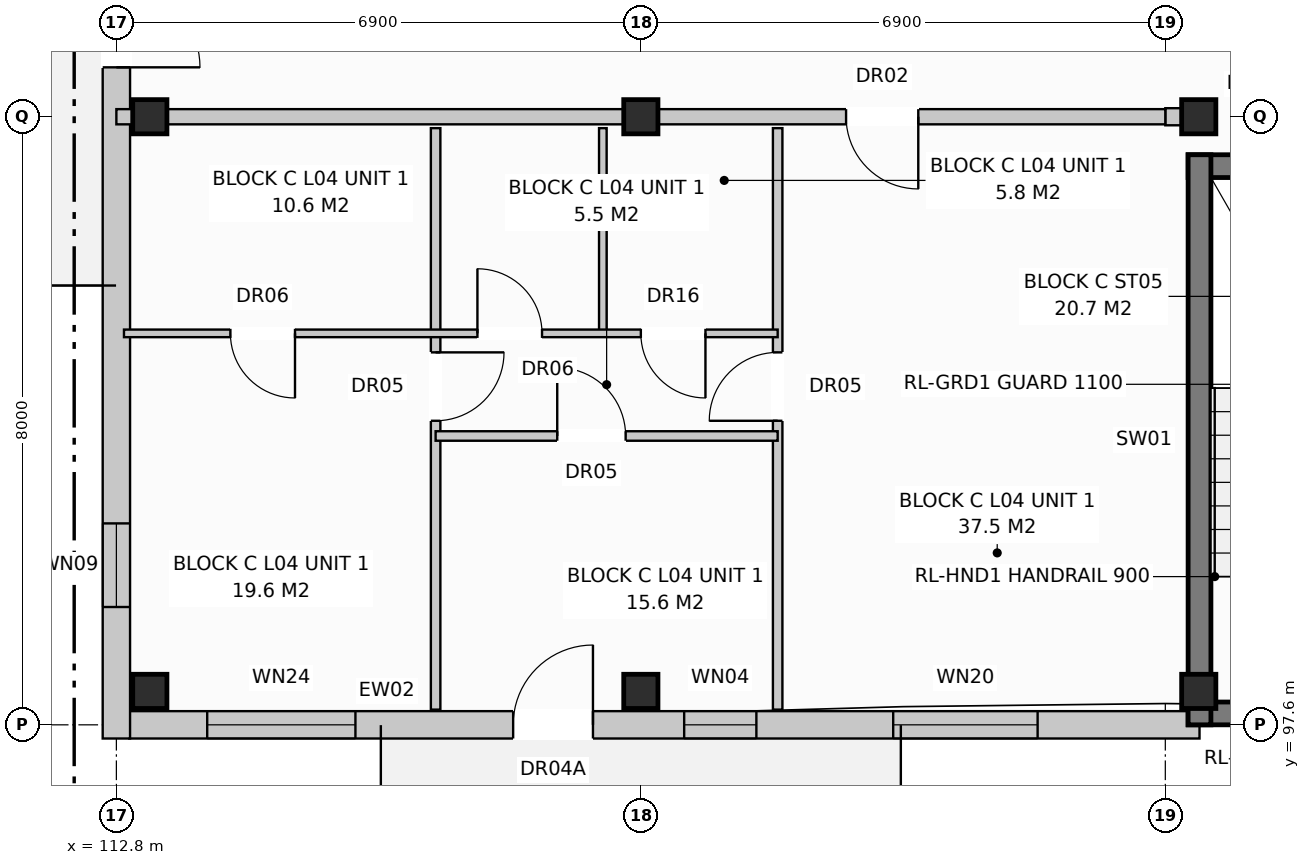
"""IFC4 building model, lengths in metres.
Left out: names, types, materials, properties, quantities, classifications, styles, units other than length and angle.
Written with IfcOpenShell. Run it as: python <this file> out.ifc"""

import sys

from ifc_helpers import new_model, si_unit, direction, frame, frame_2d, origin, origin_with_axes, origin_2d, place, context, subcontext, project, spatial, rectangle, extrude, element, fill, save


model = new_model("IFC4")
c1 = context("Model", 3, precision=1e-05, world=origin(), true_north=direction((0.0, 1.0)))
c2 = subcontext(c1, "Body", "Model", "MODEL_VIEW")
j1 = project(units=[si_unit("LENGTHUNIT", "METRE"), si_unit("PLANEANGLEUNIT", "RADIAN")], contexts=[c1])
p1 = place(None, origin())
s1 = spatial("IfcSite", under=j1, at=p1, CompositionType="ELEMENT")
p2 = place(p1, origin())
s2 = spatial("IfcBuilding", under=s1, at=p2, CompositionType="ELEMENT")
p3 = place(p2, frame((0.0, 0.0, 14.4)))
s3 = spatial("IfcBuildingStorey", under=s2, at=p3, CompositionType="ELEMENT", Elevation=14.4)
for number, where, z_axis, x_axis in (
    (1, (113.24, 98.04, 0.0), (0.0, 0.0, 1.0), (1.0, 0.0, 0.0)),
    (2, (113.24, 105.6, 0.0), (0.0, 0.0, 1.0), (1.0, 0.0, 0.0)),
    (3, (119.7, 98.04, 0.0), (0.0, 0.0, 1.0), (1.0, 0.0, 0.0)),
    (4, (119.7, 105.6, 0.0), (0.0, 0.0, 1.0), (1.0, 0.0, 0.0)),
    (5, (127.04, 98.04, 0.0), (0.0, 0.0, 1.0), (1.0, 0.0, 0.0)),
    (6, (127.04, 105.6, 0.0), (0.0, 0.0, 1.0), (1.0, 0.0, 0.0)),
):
    element("IfcColumn", number, at=place(p3, frame(where, z_axis=z_axis, x_axis=x_axis)), inside=s3, PredefinedType="COLUMN", context=c2, shape_type="SweptSolid", body=[
        extrude(rectangle(XDim=0.45, YDim=0.45, at=origin_2d()), origin(), (0.0, 0.0, 1.0), 3.2),
    ])
p4 = place(p3, frame((112.97, 97.6, 0.0), z_axis=(0.0, 0.0, 1.0), x_axis=(1.0, 0.0, 0.0)))
e7 = element("IfcWall", 7, at=p4, inside=s3, PredefinedType="STANDARD", context=c2, shape_type="SweptSolid", body=[
    extrude(rectangle(XDim=14.08, YDim=0.36, at=frame_2d((7.04, 0.0))), origin(), (0.0, 0.0, 1.0), 2.94),
])
p5 = place(p4, frame((5.05, 0.0, 0.0)))
e8 = element("IfcOpeningElement", 8, at=p5, cuts=e7, PredefinedType="OPENING", context=c2, shape_type="SweptSolid", body=[
    extrude(rectangle(XDim=1.05, YDim=2.12, at=frame_2d((0.525, 1.06))), frame((0.0, 0.192, 0.0), z_axis=(0.0, -1.0, 0.0), x_axis=(1.0, 0.0, 0.0)), (0.0, 0.0, 1.0), 0.384),
])
p6 = place(p4, frame((1.025, 0.0, 0.8)))
e9 = element("IfcOpeningElement", 9, at=p6, cuts=e7, PredefinedType="OPENING", context=c2, shape_type="SweptSolid", body=[
    extrude(rectangle(XDim=1.95, YDim=1.65, at=frame_2d((0.975, 0.825))), frame((0.0, 0.192, 0.0), z_axis=(0.0, -1.0, 0.0), x_axis=(1.0, 0.0, 0.0)), (0.0, 0.0, 1.0), 0.384),
])
p7 = place(p4, frame((7.3, 0.0, 0.9)))
e10 = element("IfcOpeningElement", 10, at=p7, cuts=e7, PredefinedType="OPENING", context=c2, shape_type="SweptSolid", body=[
    extrude(rectangle(XDim=0.95, YDim=1.55, at=frame_2d((0.475, 0.775))), frame((0.0, 0.192, 0.0), z_axis=(0.0, -1.0, 0.0), x_axis=(1.0, 0.0, 0.0)), (0.0, 0.0, 1.0), 0.384),
])
p8 = place(p4, frame((10.05, 0.0, 0.8)))
e11 = element("IfcOpeningElement", 11, at=p8, cuts=e7, PredefinedType="OPENING", context=c2, shape_type="SweptSolid", body=[
    extrude(rectangle(XDim=1.9, YDim=1.85, at=frame_2d((0.95, 0.925))), frame((0.0, 0.192, 0.0), z_axis=(0.0, -1.0, 0.0), x_axis=(1.0, 0.0, 0.0)), (0.0, 0.0, 1.0), 0.384),
])
p9 = place(p3, frame((112.8, 97.42, 0.0), z_axis=(0.0, 0.0, 1.0), x_axis=(0.0, 1.0, 0.0)))
e12 = element("IfcWall", 12, at=p9, inside=s3, PredefinedType="STANDARD", context=c2, shape_type="SweptSolid", body=[
    extrude(rectangle(XDim=18.76, YDim=0.36, at=frame_2d((9.38, 0.0))), origin(), (0.0, 0.0, 1.0), 2.94),
])
p10 = place(p9, frame((8.83, 0.0, 0.0)))
e13 = element("IfcOpeningElement", 13, at=p10, cuts=e12, PredefinedType="OPENING", context=c2, shape_type="SweptSolid", body=[
    extrude(rectangle(XDim=1.1, YDim=2.1, at=frame_2d((0.55, 1.05))), frame((0.0, 0.192, 0.0), z_axis=(0.0, -1.0, 0.0), x_axis=(1.0, 0.0, 0.0)), (0.0, 0.0, 1.0), 0.384),
])
p11 = place(p9, frame((1.73, 0.0, 0.72)))
e14 = element("IfcOpeningElement", 14, at=p11, cuts=e12, PredefinedType="OPENING", context=c2, shape_type="SweptSolid", body=[
    extrude(rectangle(XDim=1.1, YDim=1.5, at=frame_2d((0.55, 0.75))), frame((0.0, 0.192, 0.0), z_axis=(0.0, -1.0, 0.0), x_axis=(1.0, 0.0, 0.0)), (0.0, 0.0, 1.0), 0.384),
])
p12 = place(p9, frame((15.93, 0.0, 0.72)))
e15 = element("IfcOpeningElement", 15, at=p12, cuts=e12, PredefinedType="OPENING", context=c2, shape_type="SweptSolid", body=[
    extrude(rectangle(XDim=1.1, YDim=1.5, at=frame_2d((0.55, 0.75))), frame((0.0, 0.192, 0.0), z_axis=(0.0, -1.0, 0.0), x_axis=(1.0, 0.0, 0.0)), (0.0, 0.0, 1.0), 0.384),
])
for number, where, z_axis, x_axis in (
    (16, (126.9, 97.75, 0.0), (0.0, 0.0, 1.0), (1.0, 0.0, 0.0)),
    (17, (126.9, 104.95, 0.0), (0.0, 0.0, 1.0), (1.0, 0.0, 0.0)),
):
    element("IfcWall", number, at=place(p3, frame(where, z_axis=z_axis, x_axis=x_axis)), inside=s3, PredefinedType="SHEAR", context=c2, shape_type="SweptSolid", body=[
        extrude(rectangle(XDim=3.6, YDim=0.3, at=frame_2d((1.8, 0.0))), origin(), (0.0, 0.0, 1.0), 2.94),
    ])
p13 = place(p3, frame((127.05, 97.6, 0.0), z_axis=(0.0, 0.0, 1.0), x_axis=(0.0, 1.0, 0.0)))
e18 = element("IfcWall", 18, at=p13, inside=s3, PredefinedType="SHEAR", context=c2, shape_type="SweptSolid", body=[
    extrude(rectangle(XDim=7.5, YDim=0.3, at=frame_2d((3.75, 0.0))), origin(), (0.0, 0.0, 1.0), 2.94),
])
p14 = place(p3, frame((126.6, 105.6, 0.0), z_axis=(0.0, 0.0, 1.0), x_axis=(1.0, 0.0, 0.0)))
e19 = element("IfcWall", 19, at=p14, inside=s3, PredefinedType="PARTITIONING", context=c2, shape_type="SweptSolid", body=[
    extrude(rectangle(XDim=0.3, YDim=0.225, at=frame_2d((0.15, 0.0))), origin(), (0.0, 0.0, 1.0), 2.94),
])
p15 = place(p3, frame((112.8, 105.6, 0.0), z_axis=(0.0, 0.0, 1.0), x_axis=(1.0, 0.0, 0.0)))
e20 = element("IfcWall", 20, at=p15, inside=s3, PredefinedType="PARTITIONING", context=c2, shape_type="SweptSolid", body=[
    extrude(rectangle(XDim=13.8, YDim=0.2, at=frame_2d((6.9, 0.0))), origin(), (0.0, 0.0, 1.0), 2.38),
])
p16 = place(p15, frame((9.6, 0.0, 0.0)))
e21 = element("IfcOpeningElement", 21, at=p16, cuts=e20, PredefinedType="OPENING", context=c2, shape_type="SweptSolid", body=[
    extrude(rectangle(XDim=0.95, YDim=2.15, at=frame_2d((0.475, 1.075))), frame((0.0, 0.112, 0.0), z_axis=(0.0, -1.0, 0.0), x_axis=(1.0, 0.0, 0.0)), (0.0, 0.0, 1.0), 0.224),
])
p17 = place(p3, frame((121.5, 105.45, 0.0), z_axis=(0.0, 0.0, 1.0), x_axis=(0.0, -1.0, 0.0)))
e22 = element("IfcWall", 22, at=p17, inside=s3, PredefinedType="PARTITIONING", context=c2, shape_type="SweptSolid", body=[
    extrude(rectangle(XDim=7.65, YDim=0.125, at=frame_2d((3.825, 0.0))), origin(), (0.0, 0.0, 1.0), 2.94),
])
p18 = place(p17, frame((2.95, 0.0, 0.0)))
e23 = element("IfcOpeningElement", 23, at=p18, cuts=e22, PredefinedType="OPENING", context=c2, shape_type="SweptSolid", body=[
    extrude(rectangle(XDim=0.9, YDim=2.1, at=frame_2d((0.45, 1.05))), frame((0.0, 0.074, 0.0), z_axis=(0.0, -1.0, 0.0), x_axis=(1.0, 0.0, 0.0)), (0.0, 0.0, 1.0), 0.149),
])
p19 = place(p3, frame((117.0, 105.45, 0.0), z_axis=(0.0, 0.0, 1.0), x_axis=(0.0, -1.0, 0.0)))
e24 = element("IfcWall", 24, at=p19, inside=s3, PredefinedType="PARTITIONING", context=c2, shape_type="SweptSolid", body=[
    extrude(rectangle(XDim=7.65, YDim=0.125, at=frame_2d((3.825, 0.0))), origin(), (0.0, 0.0, 1.0), 2.59),
])
p20 = place(p19, frame((2.95, 0.0, 0.0)))
e25 = element("IfcOpeningElement", 25, at=p20, cuts=e24, PredefinedType="OPENING", context=c2, shape_type="SweptSolid", body=[
    extrude(rectangle(XDim=0.9, YDim=2.1, at=frame_2d((0.45, 1.05))), frame((0.0, 0.074, 0.0), z_axis=(0.0, -1.0, 0.0), x_axis=(1.0, 0.0, 0.0)), (0.0, 0.0, 1.0), 0.149),
])
p21 = place(p3, frame((119.2, 105.45, 0.0), z_axis=(0.0, 0.0, 1.0), x_axis=(0.0, -1.0, 0.0)))
e26 = element("IfcWall", 26, at=p21, inside=s3, PredefinedType="PARTITIONING", context=c2, shape_type="SweptSolid", body=[
    extrude(rectangle(XDim=2.7, YDim=0.1, at=frame_2d((1.35, 0.0))), origin(), (0.0, 0.0, 1.0), 2.94),
])
p22 = place(p3, frame((112.9, 102.75, 0.0), z_axis=(0.0, 0.0, 1.0), x_axis=(1.0, 0.0, 0.0)))
e27 = element("IfcWall", 27, at=p22, inside=s3, PredefinedType="PARTITIONING", context=c2, shape_type="SweptSolid", body=[
    extrude(rectangle(XDim=8.6, YDim=0.1, at=frame_2d((4.3, 0.0))), origin(), (0.0, 0.0, 1.0), 2.94),
])
p23 = place(p22, frame((1.4, 0.0, 0.0)))
e28 = element("IfcOpeningElement", 28, at=p23, cuts=e27, PredefinedType="OPENING", context=c2, shape_type="SweptSolid", body=[
    extrude(rectangle(XDim=0.85, YDim=2.05, at=frame_2d((0.425, 1.025))), frame((0.0, 0.062, 0.0), z_axis=(0.0, -1.0, 0.0), x_axis=(1.0, 0.0, 0.0)), (0.0, 0.0, 1.0), 0.124),
])
p24 = place(p22, frame((4.65, 0.0, 0.0)))
e29 = element("IfcOpeningElement", 29, at=p24, cuts=e27, PredefinedType="OPENING", context=c2, shape_type="SweptSolid", body=[
    extrude(rectangle(XDim=0.85, YDim=2.05, at=frame_2d((0.425, 1.025))), frame((0.0, 0.062, 0.0), z_axis=(0.0, -1.0, 0.0), x_axis=(1.0, 0.0, 0.0)), (0.0, 0.0, 1.0), 0.124),
])
p25 = place(p22, frame((6.8, 0.0, 0.0)))
e30 = element("IfcOpeningElement", 30, at=p25, cuts=e27, PredefinedType="OPENING", context=c2, shape_type="SweptSolid", body=[
    extrude(rectangle(XDim=0.85, YDim=2.1, at=frame_2d((0.425, 1.05))), frame((0.0, 0.062, 0.0), z_axis=(0.0, -1.0, 0.0), x_axis=(1.0, 0.0, 0.0)), (0.0, 0.0, 1.0), 0.124),
])
p26 = place(p3, frame((117.0, 101.4, 0.0), z_axis=(0.0, 0.0, 1.0), x_axis=(1.0, 0.0, 0.0)))
e31 = element("IfcWall", 31, at=p26, inside=s3, PredefinedType="PARTITIONING", context=c2, shape_type="SweptSolid", body=[
    extrude(rectangle(XDim=4.5, YDim=0.125, at=frame_2d((2.25, 0.0))), origin(), (0.0, 0.0, 1.0), 2.94),
])
p27 = place(p26, frame((1.6, 0.0, 0.0)))
e32 = element("IfcOpeningElement", 32, at=p27, cuts=e31, PredefinedType="OPENING", context=c2, shape_type="SweptSolid", body=[
    extrude(rectangle(XDim=0.9, YDim=2.1, at=frame_2d((0.45, 1.05))), frame((0.0, 0.074, 0.0), z_axis=(0.0, -1.0, 0.0), x_axis=(1.0, 0.0, 0.0)), (0.0, 0.0, 1.0), 0.149),
])
p28 = place(p5, origin_with_axes())
e33 = element("IfcDoor", 33, at=p28, inside=s3, OperationType="SINGLE_SWING_RIGHT", PredefinedType="DOOR", context=c2, shape_type="SweptSolid", body=[
    extrude(rectangle(XDim=1.05, YDim=2.12, at=frame_2d((0.525, 1.06))), frame((0.0, 0.025, 0.0), z_axis=(0.0, -1.0, 0.0), x_axis=(1.0, 0.0, 0.0)), (0.0, 0.0, 1.0), 0.05),
])
fill(e8, e33)
p29 = place(p6, origin_with_axes())
e34 = element("IfcWindow", 34, at=p29, inside=s3, PartitioningType="SINGLE_PANEL", PredefinedType="WINDOW", context=c2, shape_type="SweptSolid", body=[
    extrude(rectangle(XDim=1.95, YDim=1.65, at=frame_2d((0.975, 0.825))), frame((0.0, 0.03, 0.0), z_axis=(0.0, -1.0, 0.0), x_axis=(1.0, 0.0, 0.0)), (0.0, 0.0, 1.0), 0.06),
])
fill(e9, e34)
p30 = place(p7, origin_with_axes())
e35 = element("IfcWindow", 35, at=p30, inside=s3, PartitioningType="SINGLE_PANEL", PredefinedType="WINDOW", context=c2, shape_type="SweptSolid", body=[
    extrude(rectangle(XDim=0.95, YDim=1.55, at=frame_2d((0.475, 0.775))), frame((0.0, 0.03, 0.0), z_axis=(0.0, -1.0, 0.0), x_axis=(1.0, 0.0, 0.0)), (0.0, 0.0, 1.0), 0.06),
])
fill(e10, e35)
p31 = place(p8, origin_with_axes())
e36 = element("IfcWindow", 36, at=p31, inside=s3, PartitioningType="SINGLE_PANEL", PredefinedType="WINDOW", context=c2, shape_type="SweptSolid", body=[
    extrude(rectangle(XDim=1.9, YDim=1.85, at=frame_2d((0.95, 0.925))), frame((0.0, 0.03, 0.0), z_axis=(0.0, -1.0, 0.0), x_axis=(1.0, 0.0, 0.0)), (0.0, 0.0, 1.0), 0.06),
])
fill(e11, e36)
p32 = place(p10, frame((1.1, 0.0, 0.0), z_axis=(0.0, 0.0, 1.0), x_axis=(-1.0, 0.0, 0.0)))
e37 = element("IfcDoor", 37, at=p32, inside=s3, OperationType="SINGLE_SWING_LEFT", PredefinedType="DOOR", context=c2, shape_type="SweptSolid", body=[
    extrude(rectangle(XDim=1.1, YDim=2.1, at=frame_2d((0.55, 1.05))), frame((0.0, 0.025, 0.0), z_axis=(0.0, -1.0, 0.0), x_axis=(1.0, 0.0, 0.0)), (0.0, 0.0, 1.0), 0.05),
])
fill(e13, e37)
p33 = place(p11, origin_with_axes())
e38 = element("IfcWindow", 38, at=p33, inside=s3, PartitioningType="SINGLE_PANEL", PredefinedType="WINDOW", context=c2, shape_type="SweptSolid", body=[
    extrude(rectangle(XDim=1.1, YDim=1.5, at=frame_2d((0.55, 0.75))), frame((0.0, 0.03, 0.0), z_axis=(0.0, -1.0, 0.0), x_axis=(1.0, 0.0, 0.0)), (0.0, 0.0, 1.0), 0.06),
])
fill(e14, e38)
p34 = place(p16, frame((0.95, 0.0, 0.0), z_axis=(0.0, 0.0, 1.0), x_axis=(-1.0, 0.0, 0.0)))
e39 = element("IfcDoor", 39, at=p34, inside=s3, OperationType="SINGLE_SWING_RIGHT", PredefinedType="DOOR", context=c2, shape_type="SweptSolid", body=[
    extrude(rectangle(XDim=0.95, YDim=2.15, at=frame_2d((0.475, 1.075))), frame((0.0, 0.025, 0.0), z_axis=(0.0, -1.0, 0.0), x_axis=(1.0, 0.0, 0.0)), (0.0, 0.0, 1.0), 0.05),
])
fill(e21, e39)
p35 = place(p18, frame((0.9, 0.0, 0.0), z_axis=(0.0, 0.0, 1.0), x_axis=(-1.0, 0.0, 0.0)))
e40 = element("IfcDoor", 40, at=p35, inside=s3, OperationType="SINGLE_SWING_RIGHT", PredefinedType="DOOR", context=c2, shape_type="SweptSolid", body=[
    extrude(rectangle(XDim=0.9, YDim=2.1, at=frame_2d((0.45, 1.05))), frame((0.0, 0.025, 0.0), z_axis=(0.0, -1.0, 0.0), x_axis=(1.0, 0.0, 0.0)), (0.0, 0.0, 1.0), 0.05),
])
fill(e23, e40)
p36 = place(p20, origin_with_axes())
e41 = element("IfcDoor", 41, at=p36, inside=s3, OperationType="SINGLE_SWING_LEFT", PredefinedType="DOOR", context=c2, shape_type="SweptSolid", body=[
    extrude(rectangle(XDim=0.9, YDim=2.1, at=frame_2d((0.45, 1.05))), frame((0.0, 0.025, 0.0), z_axis=(0.0, -1.0, 0.0), x_axis=(1.0, 0.0, 0.0)), (0.0, 0.0, 1.0), 0.05),
])
fill(e25, e41)
p37 = place(p23, frame((0.85, 0.0, 0.0), z_axis=(0.0, 0.0, 1.0), x_axis=(-1.0, 0.0, 0.0)))
e42 = element("IfcDoor", 42, at=p37, inside=s3, OperationType="SINGLE_SWING_RIGHT", PredefinedType="DOOR", context=c2, shape_type="SweptSolid", body=[
    extrude(rectangle(XDim=0.85, YDim=2.05, at=frame_2d((0.425, 1.025))), frame((0.0, 0.025, 0.0), z_axis=(0.0, -1.0, 0.0), x_axis=(1.0, 0.0, 0.0)), (0.0, 0.0, 1.0), 0.05),
])
fill(e28, e42)
p38 = place(p24, origin_with_axes())
e43 = element("IfcDoor", 43, at=p38, inside=s3, OperationType="SINGLE_SWING_LEFT", PredefinedType="DOOR", context=c2, shape_type="SweptSolid", body=[
    extrude(rectangle(XDim=0.85, YDim=2.05, at=frame_2d((0.425, 1.025))), frame((0.0, 0.025, 0.0), z_axis=(0.0, -1.0, 0.0), x_axis=(1.0, 0.0, 0.0)), (0.0, 0.0, 1.0), 0.05),
])
fill(e29, e43)
p39 = place(p25, frame((0.85, 0.0, 0.0), z_axis=(0.0, 0.0, 1.0), x_axis=(-1.0, 0.0, 0.0)))
e44 = element("IfcDoor", 44, at=p39, inside=s3, OperationType="SINGLE_SWING_RIGHT", PredefinedType="DOOR", context=c2, shape_type="SweptSolid", body=[
    extrude(rectangle(XDim=0.85, YDim=2.1, at=frame_2d((0.425, 1.05))), frame((0.0, 0.025, 0.0), z_axis=(0.0, -1.0, 0.0), x_axis=(1.0, 0.0, 0.0)), (0.0, 0.0, 1.0), 0.05),
])
fill(e30, e44)
p40 = place(p27, origin_with_axes())
e45 = element("IfcDoor", 45, at=p40, inside=s3, OperationType="SINGLE_SWING_LEFT", PredefinedType="DOOR", context=c2, shape_type="SweptSolid", body=[
    extrude(rectangle(XDim=0.9, YDim=2.1, at=frame_2d((0.45, 1.05))), frame((0.0, 0.025, 0.0), z_axis=(0.0, -1.0, 0.0), x_axis=(1.0, 0.0, 0.0)), (0.0, 0.0, 1.0), 0.05),
])
fill(e32, e45)
save(model, sys.argv[1])
